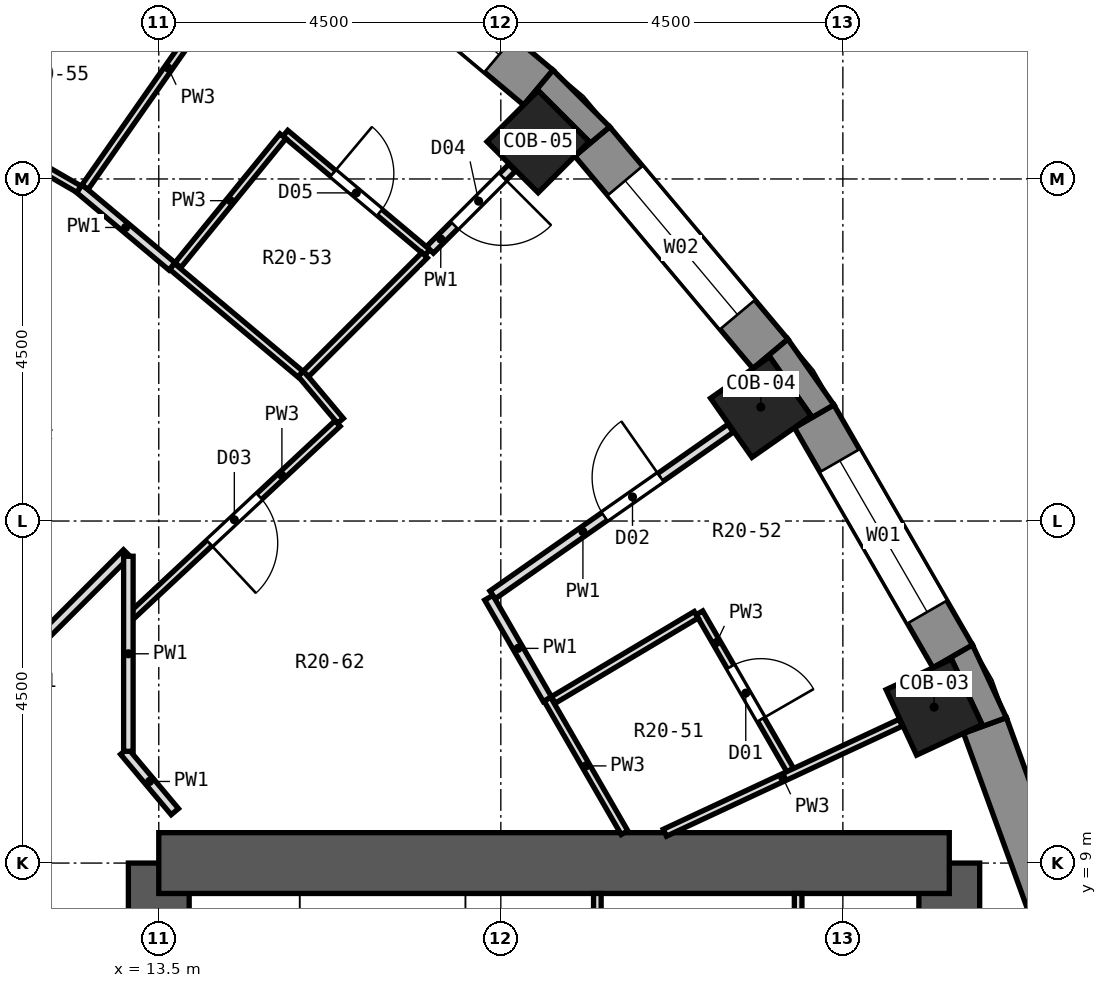
"""IFC4 building model, lengths in metres.
Left out: names, types, materials, properties, quantities, classifications, styles, units other than length and angle.
Written with IfcOpenShell. Run it as: python <this file> out.ifc"""

import sys

from ifc_helpers import new_model, si_unit, direction, frame, frame_2d, origin, origin_2d, place, context, subcontext, project, spatial, polyline, rectangle, outline, extrude, element, fill, save


model = new_model("IFC4")
c1 = context("Model", 3, precision=1e-05, world=origin(), true_north=direction((0.0, 1.0)))
c2 = subcontext(c1, "Body", "Model", "MODEL_VIEW")
j1 = project(units=[si_unit("LENGTHUNIT", "METRE"), si_unit("PLANEANGLEUNIT", "RADIAN")], contexts=[c1])
p1 = place(None, origin())
s1 = spatial("IfcSite", under=j1, at=p1, CompositionType="ELEMENT")
p2 = place(p1, origin())
s2 = spatial("IfcBuilding", under=s1, at=p2, CompositionType="ELEMENT")
p3 = place(p2, frame((0.0, 0.0, 121.6)))
s3 = spatial("IfcBuildingStorey", under=s2, at=p3, CompositionType="ELEMENT", Elevation=121.6)
for number, where, z_axis, x_axis in (
    (1, (23.7, 11.052, 0.0), (0.0, 0.0, 1.0), (0.906, 0.423, 0.0)),
    (2, (21.421, 14.999, 0.0), (0.0, 0.0, 1.0), (0.819, 0.574, 0.0)),
    (3, (18.491, 18.491, 0.0), (0.0, 0.0, 1.0), (0.707, 0.707, 0.0)),
):
    element("IfcColumn", number, at=place(p3, frame(where, z_axis=z_axis, x_axis=x_axis)), inside=s3, PredefinedType="COLUMN", context=c2, shape_type="SweptSolid", body=[
        extrude(rectangle(XDim=0.95, YDim=0.95, at=origin_2d()), origin(), (0.0, 0.0, 1.0), 3.3),
    ])
p4 = place(p3, frame((13.5, -9.0, 0.0), z_axis=(0.0, 0.0, 1.0), x_axis=(0.0, 1.0, 0.0)))
e4 = element("IfcWall", 4, at=p4, inside=s3, PredefinedType="SHEAR", context=c2, shape_type="SweptSolid", body=[
    extrude(rectangle(XDim=18.0, YDim=0.8, at=frame_2d((9.0, 0.0))), origin(), (0.0, 0.0, 1.0), 3.3),
])
p5 = place(p4, frame((15.4, 0.0, 0.0)))
e5 = element("IfcOpeningElement", 5, at=p5, cuts=e4, PredefinedType="OPENING", context=c2, shape_type="SweptSolid", body=[
    extrude(rectangle(XDim=1.2, YDim=2.1, at=frame_2d((0.6, 1.05))), frame((0.0, 0.412, 0.0), z_axis=(0.0, -1.0, 0.0), x_axis=(1.0, 0.0, 0.0)), (0.0, 0.0, 1.0), 0.824),
])
p6 = place(p4, frame((1.4, 0.0, 0.0)))
e6 = element("IfcOpeningElement", 6, at=p6, cuts=e4, PredefinedType="OPENING", context=c2, shape_type="SweptSolid", body=[
    extrude(rectangle(XDim=1.2, YDim=2.1, at=frame_2d((0.6, 1.05))), frame((0.0, 0.412, 0.0), z_axis=(0.0, -1.0, 0.0), x_axis=(1.0, 0.0, 0.0)), (0.0, 0.0, 1.0), 0.824),
])
p7 = place(p4, frame((7.5, 0.0, 0.0)))
e7 = element("IfcOpeningElement", 7, at=p7, cuts=e4, PredefinedType="OPENING", context=c2, shape_type="SweptSolid", body=[
    extrude(rectangle(XDim=3.0, YDim=2.4, at=frame_2d((1.5, 1.2))), frame((0.0, 0.412, 0.0), z_axis=(0.0, -1.0, 0.0), x_axis=(1.0, 0.0, 0.0)), (0.0, 0.0, 1.0), 0.824),
])
p8 = place(p3, frame((23.9, -9.0, 0.0), z_axis=(0.0, 0.0, 1.0), x_axis=(0.0, 1.0, 0.0)))
e8 = element("IfcWall", 8, at=p8, inside=s3, PredefinedType="SHEAR", context=c2, shape_type="SweptSolid", body=[
    extrude(rectangle(XDim=18.0, YDim=0.8, at=frame_2d((9.0, 0.0))), origin(), (0.0, 0.0, 1.0), 3.3),
])
p9 = place(p3, frame((13.5, 9.0, 0.0), z_axis=(0.0, 0.0, 1.0), x_axis=(1.0, 0.0, 0.0)))
e9 = element("IfcWall", 9, at=p9, inside=s3, PredefinedType="SHEAR", context=c2, shape_type="SweptSolid", body=[
    extrude(rectangle(XDim=10.4, YDim=0.8, at=frame_2d((5.2, 0.0))), origin(), (0.0, 0.0, 1.0), 3.3),
])
p10 = place(p3, frame((25.617, 7.383, 0.0), z_axis=(0.0, 0.0, 1.0), x_axis=(-0.341990236633, 0.939703505393, 0.0)))
e10 = element("IfcWall", 10, at=p10, inside=s3, PredefinedType="SOLIDWALL", context=c2, shape_type="SweptSolid", body=[
    extrude(rectangle(XDim=3.648, YDim=0.6, at=frame_2d((1.824, 0.0))), origin(), (0.0, 0.0, 1.0), 2.8),
])
p11 = place(p3, frame((23.946, 11.719, 0.0), z_axis=(0.0, 0.0, 1.0), x_axis=(-0.499954196102, 0.866051847062, 0.0)))
e11 = element("IfcWall", 11, at=p11, inside=s3, PredefinedType="SOLIDWALL", context=c2, shape_type="SweptSolid", body=[
    extrude(rectangle(XDim=3.648, YDim=0.6, at=frame_2d((1.824, 0.0))), origin(), (0.0, 0.0, 1.0), 2.8),
])
p12 = place(p11, frame((0.674, 0.0, 0.9)))
e12 = element("IfcOpeningElement", 12, at=p12, cuts=e11, PredefinedType="OPENING", context=c2, shape_type="SweptSolid", body=[
    extrude(rectangle(XDim=2.3, YDim=1.8, at=frame_2d((1.15, 0.9))), frame((0.0, 0.312, 0.0), z_axis=(0.0, -1.0, 0.0), x_axis=(1.0, 0.0, 0.0)), (0.0, 0.0, 1.0), 0.624),
])
p13 = place(p3, frame((21.547, 15.699, 0.0), z_axis=(0.0, 0.0, 1.0), x_axis=(-0.642774476932, 0.766055462616, 0.0)))
e13 = element("IfcWall", 13, at=p13, inside=s3, PredefinedType="SOLIDWALL", context=c2, shape_type="SweptSolid", body=[
    extrude(rectangle(XDim=3.648, YDim=0.6, at=frame_2d((1.824, 0.0))), origin(), (0.0, 0.0, 1.0), 2.8),
])
p14 = place(p13, frame((0.674, 0.0, 0.9)))
e14 = element("IfcOpeningElement", 14, at=p14, cuts=e13, PredefinedType="OPENING", context=c2, shape_type="SweptSolid", body=[
    extrude(rectangle(XDim=2.3, YDim=1.8, at=frame_2d((1.15, 0.9))), frame((0.0, 0.312, 0.0), z_axis=(0.0, -1.0, 0.0), x_axis=(1.0, 0.0, 0.0)), (0.0, 0.0, 1.0), 0.624),
])
p15 = place(p3, frame((18.494, 19.202, 0.0), z_axis=(0.0, 0.0, 1.0), x_axis=(-0.766055462616, 0.642774476932, 0.0)))
e15 = element("IfcWall", 15, at=p15, inside=s3, PredefinedType="SOLIDWALL", context=c2, shape_type="SweptSolid", body=[
    extrude(rectangle(XDim=3.648, YDim=0.6, at=frame_2d((1.824, 0.0))), origin(), (0.0, 0.0, 1.0), 2.8),
])
p16 = place(p15, frame((0.674, 0.0, 0.9)))
e16 = element("IfcOpeningElement", 16, at=p16, cuts=e15, PredefinedType="OPENING", context=c2, shape_type="SweptSolid", body=[
    extrude(rectangle(XDim=2.3, YDim=1.8, at=frame_2d((1.15, 0.9))), frame((0.0, 0.312, 0.0), z_axis=(0.0, -1.0, 0.0), x_axis=(1.0, 0.0, 0.0)), (0.0, 0.0, 1.0), 0.624),
])
p17 = place(p3, origin())
e17 = element("IfcWall", 17, at=p17, inside=s3, PredefinedType="SOLIDWALL", context=c2, shape_type="SweptSolid", body=[
    extrude(outline(polyline([(24.651, 10.913), (24.206, 11.869), (23.686, 11.569), (23.93, 11.683), (24.331, 10.822), (24.087, 10.708), (24.651, 10.913)])), origin(), (0.0, 0.0, 1.0), 2.8),
])
p18 = place(p3, origin())
e18 = element("IfcWall", 18, at=p18, inside=s3, PredefinedType="SOLIDWALL", context=c2, shape_type="SweptSolid", body=[
    extrude(outline(polyline([(21.777, 15.892), (21.317, 15.506), (21.538, 15.661), (22.083, 14.882), (21.862, 14.728), (22.382, 15.028), (21.777, 15.892)])), origin(), (0.0, 0.0, 1.0), 2.8),
])
p19 = place(p3, origin())
e19 = element("IfcWall", 19, at=p19, inside=s3, PredefinedType="SOLIDWALL", context=c2, shape_type="SweptSolid", body=[
    extrude(outline(polyline([(19.432, 18.686), (18.686, 19.432), (18.301, 18.972), (18.491, 19.163), (19.163, 18.491), (18.972, 18.301), (19.432, 18.686)])), origin(), (0.0, 0.0, 1.0), 2.8),
])
p20 = place(p3, frame((18.612, 11.157, 0.0), z_axis=(0.0, 0.0, 1.0), x_axis=(0.500111227227, -0.865961177191, 0.0)))
e20 = element("IfcWall", 20, at=p20, inside=s3, PredefinedType="PARTITIONING", context=c2, shape_type="SweptSolid", body=[
    extrude(rectangle(XDim=2.029, YDim=0.1, at=frame_2d((1.015, 0.0))), origin(), (0.0, 0.0, 1.0), 2.8),
])
p21 = place(p3, frame((17.842, 12.491, 0.0), z_axis=(0.0, 0.0, 1.0), x_axis=(0.499923693419, -0.866069454927, 0.0)))
e21 = element("IfcWall", 21, at=p21, inside=s3, PredefinedType="PARTITIONING", context=c2, shape_type="SweptSolid", body=[
    extrude(rectangle(XDim=1.54, YDim=0.125, at=frame_2d((0.77, 0.0))), origin(), (0.0, 0.0, 1.0), 2.8),
])
p22 = place(p3, frame((20.613, 12.292, 0.0), z_axis=(0.0, 0.0, 1.0), x_axis=(0.499855185972, -0.866108996061, 0.0)))
e22 = element("IfcWall", 22, at=p22, inside=s3, PredefinedType="PARTITIONING", context=c2, shape_type="SweptSolid", body=[
    extrude(rectangle(XDim=2.388, YDim=0.1, at=frame_2d((1.194, 0.0))), origin(), (0.0, 0.0, 1.0), 2.8),
])
p23 = place(p22, frame((0.819, 0.0, 0.0)))
e23 = element("IfcOpeningElement", 23, at=p23, cuts=e22, PredefinedType="OPENING", context=c2, shape_type="SweptSolid", body=[
    extrude(rectangle(XDim=0.8, YDim=2.1, at=frame_2d((0.4, 1.05))), frame((0.0, 0.062, 0.0), z_axis=(0.0, -1.0, 0.0), x_axis=(1.0, 0.0, 0.0)), (0.0, 0.0, 1.0), 0.124),
])
p24 = place(p3, frame((13.045, 10.47, 0.0), z_axis=(0.0, 0.0, 1.0), x_axis=(0.642683640722, -0.766131671417, 0.0)))
e24 = element("IfcWall", 24, at=p24, inside=s3, PredefinedType="PARTITIONING", context=c2, shape_type="SweptSolid", body=[
    extrude(rectangle(XDim=1.036, YDim=0.125, at=frame_2d((0.518, 0.0))), origin(), (0.0, 0.0, 1.0), 2.8),
])
p25 = place(p3, frame((15.368, 15.44, 0.0), z_axis=(0.0, 0.0, 1.0), x_axis=(0.643079214365, -0.765799663131, 0.0)))
e25 = element("IfcWall", 25, at=p25, inside=s3, PredefinedType="PARTITIONING", context=c2, shape_type="SweptSolid", body=[
    extrude(rectangle(XDim=0.812, YDim=0.1, at=frame_2d((0.406, 0.0))), origin(), (0.0, 0.0, 1.0), 2.8),
])
p26 = place(p3, frame((13.674, 16.85, 0.0), z_axis=(0.0, 0.0, 1.0), x_axis=(0.766138779905, -0.642675166725, 0.0)))
e26 = element("IfcWall", 26, at=p26, inside=s3, PredefinedType="PARTITIONING", context=c2, shape_type="SweptSolid", body=[
    extrude(rectangle(XDim=2.205, YDim=0.1, at=frame_2d((1.103, 0.0))), origin(), (0.0, 0.0, 1.0), 2.8),
])
p27 = place(p3, frame((12.454, 17.874, 0.0), z_axis=(0.0, 0.0, 1.0), x_axis=(0.765991783553, -0.642850361693, 0.0)))
e27 = element("IfcWall", 27, at=p27, inside=s3, PredefinedType="PARTITIONING", context=c2, shape_type="SweptSolid", body=[
    extrude(rectangle(XDim=1.592, YDim=0.125, at=frame_2d((0.796, 0.0))), origin(), (0.0, 0.0, 1.0), 2.8),
])
p28 = place(p3, frame((15.165, 18.601, 0.0), z_axis=(0.0, 0.0, 1.0), x_axis=(0.765894146118, -0.642966684161, 0.0)))
e28 = element("IfcWall", 28, at=p28, inside=s3, PredefinedType="PARTITIONING", context=c2, shape_type="SweptSolid", body=[
    extrude(rectangle(XDim=2.439, YDim=0.1, at=frame_2d((1.219, 0.0))), origin(), (0.0, 0.0, 1.0), 2.8),
])
p29 = place(p28, frame((0.819, 0.0, 0.0)))
e29 = element("IfcOpeningElement", 29, at=p29, cuts=e28, PredefinedType="OPENING", context=c2, shape_type="SweptSolid", body=[
    extrude(rectangle(XDim=0.8, YDim=2.1, at=frame_2d((0.4, 1.05))), frame((0.0, 0.062, 0.0), z_axis=(0.0, -1.0, 0.0), x_axis=(1.0, 0.0, 0.0)), (0.0, 0.0, 1.0), 0.124),
])
p30 = place(p3, frame((10.54, 18.969, 0.0), z_axis=(0.0, 0.0, 1.0), x_axis=(0.866006764117, -0.500032283461, 0.0)))
e30 = element("IfcWall", 30, at=p30, inside=s3, PredefinedType="PARTITIONING", context=c2, shape_type="SweptSolid", body=[
    extrude(rectangle(XDim=2.205, YDim=0.1, at=frame_2d((1.103, 0.0))), origin(), (0.0, 0.0, 1.0), 2.8),
])
p31 = place(p3, frame((20.158, 9.399, 0.0), z_axis=(0.0, 0.0, 1.0), x_axis=(0.906223222272, 0.422799564114, 0.0)))
e31 = element("IfcWall", 31, at=p31, inside=s3, PredefinedType="PARTITIONING", context=c2, shape_type="SweptSolid", body=[
    extrude(rectangle(XDim=3.423, YDim=0.1, at=frame_2d((1.711, 0.0))), origin(), (0.0, 0.0, 1.0), 2.8),
])
p32 = place(p3, frame((18.691, 11.146, 0.0), z_axis=(0.0, 0.0, 1.0), x_axis=(0.858956412084, 0.512048710711, 0.0)))
e32 = element("IfcWall", 32, at=p32, inside=s3, PredefinedType="PARTITIONING", context=c2, shape_type="SweptSolid", body=[
    extrude(rectangle(XDim=2.188, YDim=0.1, at=frame_2d((1.094, 0.0))), origin(), (0.0, 0.0, 1.0), 2.8),
])
p33 = place(p3, frame((17.892, 12.529, 0.0), z_axis=(0.0, 0.0, 1.0), x_axis=(0.819258924995, 0.573423764607, 0.0)))
e33 = element("IfcWall", 33, at=p33, inside=s3, PredefinedType="PARTITIONING", context=c2, shape_type="SweptSolid", body=[
    extrude(rectangle(XDim=3.823, YDim=0.125, at=frame_2d((1.911, 0.0))), origin(), (0.0, 0.0, 1.0), 2.8),
])
p34 = place(p33, frame((1.796, 0.0, 0.0)))
e34 = element("IfcOpeningElement", 34, at=p34, cuts=e33, PredefinedType="OPENING", context=c2, shape_type="SweptSolid", body=[
    extrude(rectangle(XDim=0.9, YDim=2.1, at=frame_2d((0.45, 1.05))), frame((0.0, 0.074, 0.0), z_axis=(0.0, -1.0, 0.0), x_axis=(1.0, 0.0, 0.0)), (0.0, 0.0, 1.0), 0.149),
])
p35 = place(p3, frame((13.146, 12.259, 0.0), z_axis=(0.0, 0.0, 1.0), x_axis=(0.731186864942, 0.682177226633, 0.0)))
e35 = element("IfcWall", 35, at=p35, inside=s3, PredefinedType="PARTITIONING", context=c2, shape_type="SweptSolid", body=[
    extrude(rectangle(XDim=3.701, YDim=0.1, at=frame_2d((1.851, 0.0))), origin(), (0.0, 0.0, 1.0), 2.8),
])
p36 = place(p35, frame((1.394, 0.0, 0.0)))
e36 = element("IfcOpeningElement", 36, at=p36, cuts=e35, PredefinedType="OPENING", context=c2, shape_type="SweptSolid", body=[
    extrude(rectangle(XDim=0.9, YDim=2.1, at=frame_2d((0.45, 1.05))), frame((0.0, 0.062, 0.0), z_axis=(0.0, -1.0, 0.0), x_axis=(1.0, 0.0, 0.0)), (0.0, 0.0, 1.0), 0.124),
])
p37 = place(p3, frame((15.436, 15.436, 0.0), z_axis=(0.0, 0.0, 1.0), x_axis=(0.707106781187, 0.707106781187, 0.0)))
e37 = element("IfcWall", 37, at=p37, inside=s3, PredefinedType="PARTITIONING", context=c2, shape_type="SweptSolid", body=[
    extrude(rectangle(XDim=2.208, YDim=0.1, at=frame_2d((1.104, 0.0))), origin(), (0.0, 0.0, 1.0), 2.8),
])
p38 = place(p3, frame((9.697, 9.695, 0.0), z_axis=(0.0, 0.0, 1.0), x_axis=(0.707106781187, 0.707106781187, 0.0)))
e38 = element("IfcWall", 38, at=p38, inside=s3, PredefinedType="PARTITIONING", context=c2, shape_type="SweptSolid", body=[
    extrude(rectangle(XDim=4.784, YDim=0.125, at=frame_2d((2.392, 0.0))), origin(), (0.0, 0.0, 1.0), 2.8),
])
p39 = place(p3, frame((17.068, 17.068, 0.0), z_axis=(0.0, 0.0, 1.0), x_axis=(0.707106781187, 0.707106781187, 0.0)))
e39 = element("IfcWall", 39, at=p39, inside=s3, PredefinedType="PARTITIONING", context=c2, shape_type="SweptSolid", body=[
    extrude(rectangle(XDim=1.527, YDim=0.125, at=frame_2d((0.763, 0.0))), origin(), (0.0, 0.0, 1.0), 2.8),
])
p40 = place(p39, frame((0.455, 0.0, 0.0)))
e40 = element("IfcOpeningElement", 40, at=p40, cuts=e39, PredefinedType="OPENING", context=c2, shape_type="SweptSolid", body=[
    extrude(rectangle(XDim=0.9, YDim=2.1, at=frame_2d((0.45, 1.05))), frame((0.0, 0.074, 0.0), z_axis=(0.0, -1.0, 0.0), x_axis=(1.0, 0.0, 0.0)), (0.0, 0.0, 1.0), 0.149),
])
p41 = place(p3, frame((13.751, 16.866, 0.0), z_axis=(0.0, 0.0, 1.0), x_axis=(0.631692824826, 0.775218791738, 0.0)))
e41 = element("IfcWall", 41, at=p41, inside=s3, PredefinedType="PARTITIONING", context=c2, shape_type="SweptSolid", body=[
    extrude(rectangle(XDim=2.188, YDim=0.1, at=frame_2d((1.094, 0.0))), origin(), (0.0, 0.0, 1.0), 2.8),
])
p42 = place(p3, frame((12.53, 17.892, 0.0), z_axis=(0.0, 0.0, 1.0), x_axis=(0.573235132975, 0.819390921553, 0.0)))
e42 = element("IfcWall", 42, at=p42, inside=s3, PredefinedType="PARTITIONING", context=c2, shape_type="SweptSolid", body=[
    extrude(rectangle(XDim=3.823, YDim=0.1, at=frame_2d((1.911, 0.0))), origin(), (0.0, 0.0, 1.0), 2.8),
])
p43 = place(p3, frame((13.1, 10.47, 0.0), z_axis=(0.0, 0.0, 1.0), x_axis=(0.0, 1.0, 0.0)))
e43 = element("IfcWall", 43, at=p43, inside=s3, PredefinedType="PARTITIONING", context=c2, shape_type="SweptSolid", body=[
    extrude(rectangle(XDim=2.566, YDim=0.125, at=frame_2d((1.283, 0.0))), origin(), (0.0, 0.0, 1.0), 2.8),
])
p44 = place(p3, frame((19.27, 5.25, 0.0), z_axis=(0.0, 0.0, 1.0), x_axis=(0.0, 1.0, 0.0)))
e44 = element("IfcWall", 44, at=p44, inside=s3, PredefinedType="PARTITIONING", context=c2, shape_type="SweptSolid", body=[
    extrude(rectangle(XDim=3.35, YDim=0.1, at=frame_2d((1.675, 0.0))), origin(), (0.0, 0.0, 1.0), 2.8),
])
p45 = place(p3, frame((21.912, 5.25, 0.0), z_axis=(0.0, 0.0, 1.0), x_axis=(0.0, 1.0, 0.0)))
e45 = element("IfcWall", 45, at=p45, inside=s3, PredefinedType="PARTITIONING", context=c2, shape_type="SweptSolid", body=[
    extrude(rectangle(XDim=3.35, YDim=0.1, at=frame_2d((1.675, 0.0))), origin(), (0.0, 0.0, 1.0), 2.8),
])
p46 = place(p45, frame((1.225, 0.0, 0.0)))
e46 = element("IfcOpeningElement", 46, at=p46, cuts=e45, PredefinedType="OPENING", context=c2, shape_type="SweptSolid", body=[
    extrude(rectangle(XDim=0.9, YDim=2.1, at=frame_2d((0.45, 1.05))), frame((0.0, 0.062, 0.0), z_axis=(0.0, -1.0, 0.0), x_axis=(1.0, 0.0, 0.0)), (0.0, 0.0, 1.0), 0.124),
])
p47 = place(p12, origin())
e47 = element("IfcWindow", 47, at=p47, inside=s3, PartitioningType="SINGLE_PANEL", PredefinedType="WINDOW", context=c2, shape_type="SweptSolid", body=[
    extrude(rectangle(XDim=2.3, YDim=1.8, at=frame_2d((1.15, 0.9))), frame((0.0, 0.18, 0.0), z_axis=(0.0, -1.0, 0.0), x_axis=(1.0, 0.0, 0.0)), (0.0, 0.0, 1.0), 0.06),
])
fill(e12, e47)
p48 = place(p14, origin())
e48 = element("IfcWindow", 48, at=p48, inside=s3, PartitioningType="SINGLE_PANEL", PredefinedType="WINDOW", context=c2, shape_type="SweptSolid", body=[
    extrude(rectangle(XDim=2.3, YDim=1.8, at=frame_2d((1.15, 0.9))), frame((0.0, 0.18, 0.0), z_axis=(0.0, -1.0, 0.0), x_axis=(1.0, 0.0, 0.0)), (0.0, 0.0, 1.0), 0.06),
])
fill(e14, e48)
p49 = place(p16, origin())
e49 = element("IfcWindow", 49, at=p49, inside=s3, PartitioningType="SINGLE_PANEL", PredefinedType="WINDOW", context=c2, shape_type="SweptSolid", body=[
    extrude(rectangle(XDim=2.3, YDim=1.8, at=frame_2d((1.15, 0.9))), frame((0.0, 0.18, 0.0), z_axis=(0.0, -1.0, 0.0), x_axis=(1.0, 0.0, 0.0)), (0.0, 0.0, 1.0), 0.06),
])
fill(e16, e49)
p50 = place(p23, origin())
e50 = element("IfcDoor", 50, at=p50, inside=s3, OperationType="SINGLE_SWING_RIGHT", PredefinedType="DOOR", context=c2, shape_type="SweptSolid", body=[
    extrude(rectangle(XDim=0.8, YDim=2.1, at=frame_2d((0.4, 1.05))), frame((0.0, 0.025, 0.0), z_axis=(0.0, -1.0, 0.0), x_axis=(1.0, 0.0, 0.0)), (0.0, 0.0, 1.0), 0.05),
])
fill(e23, e50)
p51 = place(p34, origin())
e51 = element("IfcDoor", 51, at=p51, inside=s3, OperationType="SINGLE_SWING_RIGHT", PredefinedType="DOOR", context=c2, shape_type="SweptSolid", body=[
    extrude(rectangle(XDim=0.9, YDim=2.1, at=frame_2d((0.45, 1.05))), frame((0.0, 0.025, 0.0), z_axis=(0.0, -1.0, 0.0), x_axis=(1.0, 0.0, 0.0)), (0.0, 0.0, 1.0), 0.05),
])
fill(e34, e51)
p52 = place(p36, frame((0.9, 0.0, 0.0), z_axis=(0.0, 0.0, 1.0), x_axis=(-1.0, 0.0, 0.0)))
e52 = element("IfcDoor", 52, at=p52, inside=s3, OperationType="SINGLE_SWING_RIGHT", PredefinedType="DOOR", context=c2, shape_type="SweptSolid", body=[
    extrude(rectangle(XDim=0.9, YDim=2.1, at=frame_2d((0.45, 1.05))), frame((0.0, 0.025, 0.0), z_axis=(0.0, -1.0, 0.0), x_axis=(1.0, 0.0, 0.0)), (0.0, 0.0, 1.0), 0.05),
])
fill(e36, e52)
p53 = place(p40, frame((0.9, 0.0, 0.0), z_axis=(0.0, 0.0, 1.0), x_axis=(-1.0, 0.0, 0.0)))
e53 = element("IfcDoor", 53, at=p53, inside=s3, OperationType="SINGLE_SWING_LEFT", PredefinedType="DOOR", context=c2, shape_type="SweptSolid", body=[
    extrude(rectangle(XDim=0.9, YDim=2.1, at=frame_2d((0.45, 1.05))), frame((0.0, 0.025, 0.0), z_axis=(0.0, -1.0, 0.0), x_axis=(1.0, 0.0, 0.0)), (0.0, 0.0, 1.0), 0.05),
])
fill(e40, e53)
p54 = place(p29, origin())
e54 = element("IfcDoor", 54, at=p54, inside=s3, OperationType="SINGLE_SWING_LEFT", PredefinedType="DOOR", context=c2, shape_type="SweptSolid", body=[
    extrude(rectangle(XDim=0.8, YDim=2.1, at=frame_2d((0.4, 1.05))), frame((0.0, 0.025, 0.0), z_axis=(0.0, -1.0, 0.0), x_axis=(1.0, 0.0, 0.0)), (0.0, 0.0, 1.0), 0.05),
])
fill(e29, e54)
save(model, sys.argv[1])
